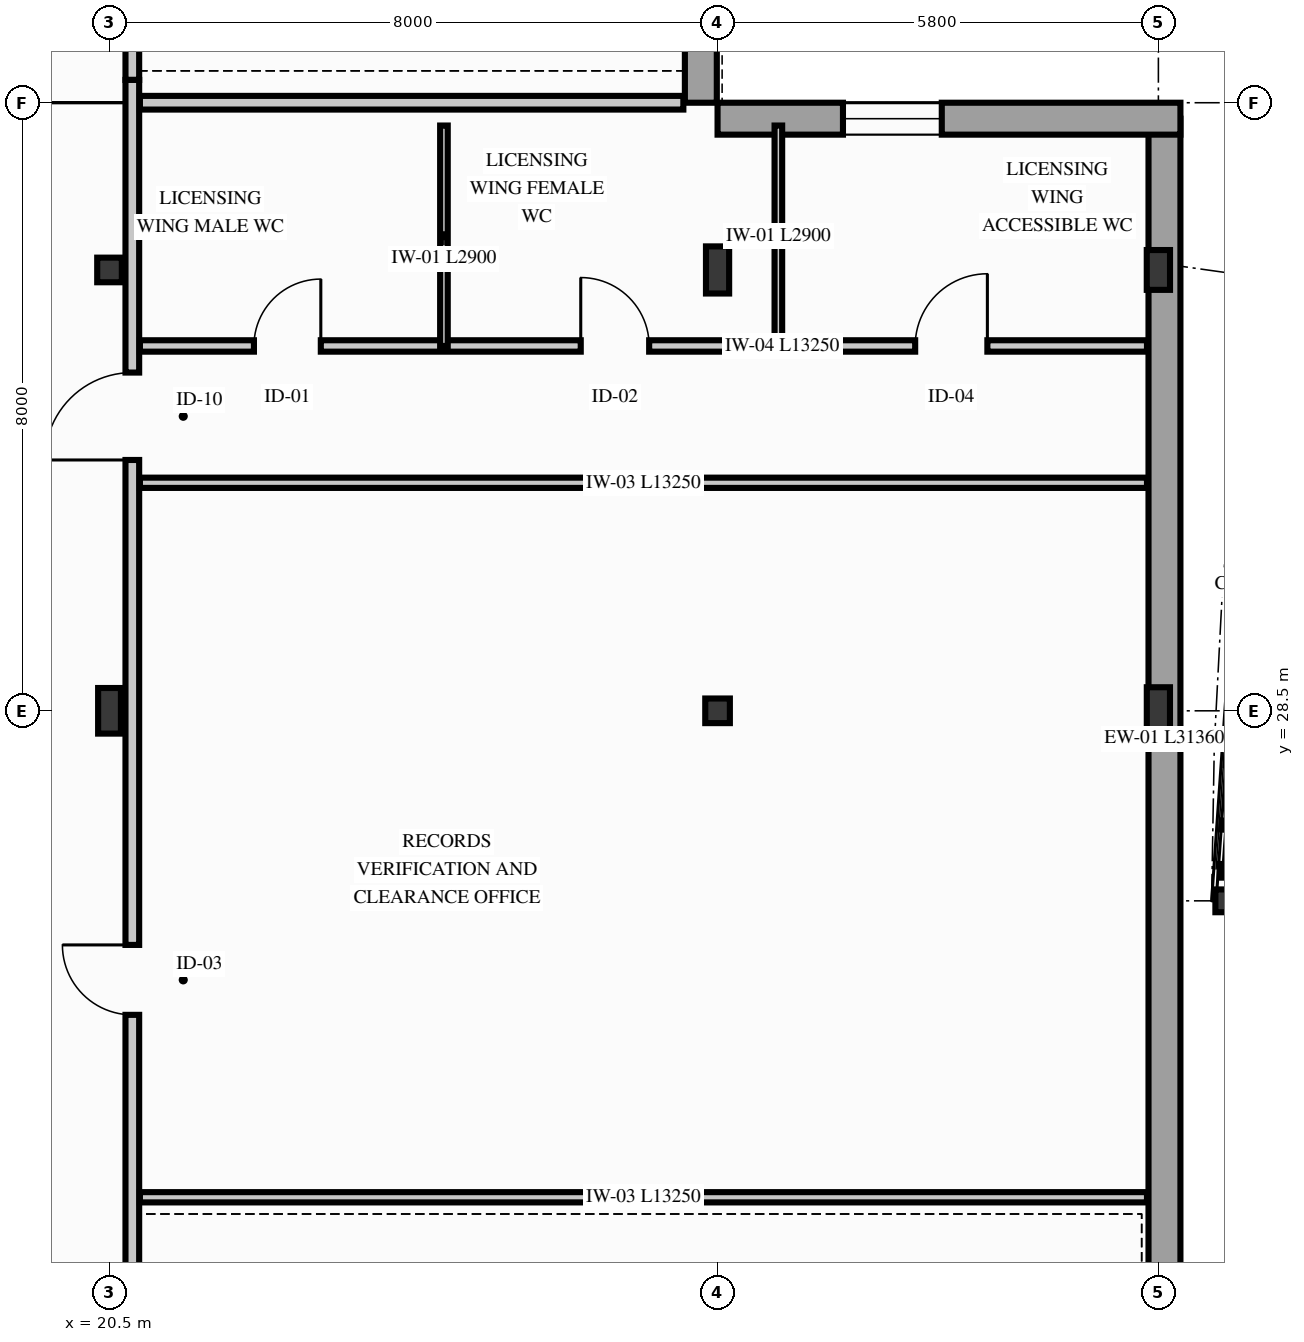
"""IFC4 building model, lengths in metres.
Left out: names, types, materials, properties, quantities, classifications, styles, units other than length and angle.
Written with IfcOpenShell. Run it as: python <this file> out.ifc"""

import sys

from ifc_helpers import new_model, si_unit, direction, frame, frame_2d, origin, origin_2d, place, context, subcontext, project, spatial, rectangle, hollow_circle, i_section, extrude, element, fill, save


model = new_model("IFC4")
c1 = context("Model", 3, precision=1e-05, world=origin(), true_north=direction((0.0, 1.0)))
c2 = subcontext(c1, "Body", "Model", "MODEL_VIEW")
j1 = project(units=[si_unit("LENGTHUNIT", "METRE"), si_unit("PLANEANGLEUNIT", "RADIAN")], contexts=[c1])
p1 = place(None, origin())
s1 = spatial("IfcSite", under=j1, at=p1, CompositionType="ELEMENT")
p2 = place(p1, origin())
s2 = spatial("IfcBuilding", under=s1, at=p2, CompositionType="ELEMENT")
p3 = place(p2, frame((0.0, 0.0, 5.1)))
s3 = spatial("IfcBuildingStorey", under=s2, at=p3, CompositionType="ELEMENT", Elevation=5.1)
for number, where, z_axis, x_axis in (
    (1, (35.35, 26.0, 0.0), (0.0, 0.0, 1.0), (0.0, 1.0, 0.0)),
    (2, (20.5, 28.5, 0.0), (0.0, 0.0, 1.0), (1.0, 0.0, 0.0)),
):
    element("IfcColumn", number, at=place(p3, frame(where, z_axis=z_axis, x_axis=x_axis)), inside=s3, PredefinedType="COLUMN", context=c2, shape_type="SweptSolid", body=[
        extrude(i_section(OverallWidth=0.3, OverallDepth=0.6, WebThickness=0.015, FlangeThickness=0.03, FilletRadius=0.027, at=origin_2d()), origin(), (0.0, 0.0, 1.0), 4.2),
    ])
for number, where, z_axis, x_axis in (
    (3, (20.5, 34.3, 0.0), (0.0, 0.0, 1.0), (1.0, 0.0, 0.0)),
    (4, (28.5, 28.5, 0.0), (0.0, 0.0, 1.0), (1.0, 0.0, 0.0)),
):
    element("IfcColumn", number, at=place(p3, frame(where, z_axis=z_axis, x_axis=x_axis)), inside=s3, PredefinedType="COLUMN", context=c2, shape_type="SweptSolid", body=[
        extrude(hollow_circle(Radius=0.162, WallThickness=0.016, at=origin_2d()), origin(), (0.0, 0.0, 1.0), 4.2),
    ])
for number, where, z_axis, x_axis in (
    (5, (28.5, 34.3, 0.0), (0.0, 0.0, 1.0), (1.0, 0.0, 0.0)),
    (6, (34.3, 28.5, 0.0), (0.0, 0.0, 1.0), (1.0, 0.0, 0.0)),
):
    element("IfcColumn", number, at=place(p3, frame(where, z_axis=z_axis, x_axis=x_axis)), inside=s3, PredefinedType="COLUMN", context=c2, shape_type="SweptSolid", body=[
        extrude(i_section(OverallWidth=0.305, OverallDepth=0.62, WebThickness=0.021, FlangeThickness=0.04, FilletRadius=0.027, at=origin_2d()), origin(), (0.0, 0.0, 1.0), 4.2),
    ])
p4 = place(p3, frame((34.3, 34.3, 0.0), z_axis=(0.0, 0.0, 1.0), x_axis=(1.0, 0.0, 0.0)))
e7 = element("IfcColumn", 7, at=p4, inside=s3, PredefinedType="COLUMN", context=c2, shape_type="SweptSolid", body=[
    extrude(i_section(OverallWidth=0.306, OverallDepth=0.524, WebThickness=0.021, FlangeThickness=0.04, FilletRadius=0.027, at=origin_2d()), origin(), (0.0, 0.0, 1.0), 4.2),
])
p5 = place(p3, frame((34.38, 4.93, 0.0), z_axis=(0.0, 0.0, 1.0), x_axis=(0.0, 1.0, 0.0)))
e8 = element("IfcWall", 8, at=p5, inside=s3, PredefinedType="SOLIDWALL", context=c2, shape_type="SweptSolid", body=[
    extrude(rectangle(XDim=31.36, YDim=0.42, at=frame_2d((15.68, 0.0))), origin(), (0.0, 0.0, 1.0), 3.68),
])
p6 = place(p5, frame((1.65, 0.0, 0.85)))
e9 = element("IfcOpeningElement", 9, at=p6, cuts=e8, PredefinedType="OPENING", context=c2, shape_type="SweptSolid", body=[
    extrude(rectangle(XDim=1.3, YDim=2.15, at=frame_2d((0.65, 1.075))), frame((0.0, 0.22, 0.0), z_axis=(0.0, -1.0, 0.0), x_axis=(1.0, 0.0, 0.0)), (0.0, 0.0, 1.0), 0.44),
])
p7 = place(p5, frame((9.65, 0.0, 0.74)))
e10 = element("IfcOpeningElement", 10, at=p7, cuts=e8, PredefinedType="OPENING", context=c2, shape_type="SweptSolid", body=[
    extrude(rectangle(XDim=1.6, YDim=2.4, at=frame_2d((0.8, 1.2))), frame((0.0, 0.22, 0.0), z_axis=(0.0, -1.0, 0.0), x_axis=(1.0, 0.0, 0.0)), (0.0, 0.0, 1.0), 0.44),
])
p8 = place(p5, frame((13.65, 0.0, 0.85)))
e11 = element("IfcOpeningElement", 11, at=p8, cuts=e8, PredefinedType="OPENING", context=c2, shape_type="SweptSolid", body=[
    extrude(rectangle(XDim=1.4, YDim=2.2, at=frame_2d((0.7, 1.1))), frame((0.0, 0.22, 0.0), z_axis=(0.0, -1.0, 0.0), x_axis=(1.0, 0.0, 0.0)), (0.0, 0.0, 1.0), 0.44),
])
p9 = place(p3, frame((28.5, 36.29, 0.0), z_axis=(0.0, 0.0, 1.0), x_axis=(1.0, 0.0, 0.0)))
e12 = element("IfcWall", 12, at=p9, inside=s3, PredefinedType="SOLIDWALL", context=c2, shape_type="SweptSolid", body=[
    extrude(rectangle(XDim=6.09, YDim=0.42, at=frame_2d((3.045, 0.0))), origin(), (0.0, 0.0, 1.0), 3.94),
])
p10 = place(p9, frame((1.65, 0.0, 0.85)))
e13 = element("IfcOpeningElement", 13, at=p10, cuts=e12, PredefinedType="OPENING", context=c2, shape_type="SweptSolid", body=[
    extrude(rectangle(XDim=1.3, YDim=2.15, at=frame_2d((0.65, 1.075))), frame((0.0, 0.22, 0.0), z_axis=(0.0, -1.0, 0.0), x_axis=(1.0, 0.0, 0.0)), (0.0, 0.0, 1.0), 0.44),
])
p11 = place(p3, frame((28.28, 36.5, 0.0), z_axis=(0.0, 0.0, 1.0), x_axis=(0.0, 1.0, 0.0)))
e14 = element("IfcWall", 14, at=p11, inside=s3, PredefinedType="SOLIDWALL", context=c2, shape_type="SweptSolid", body=[
    extrude(rectangle(XDim=47.0, YDim=0.42, at=frame_2d((23.5, 0.0))), origin(), (0.0, 0.0, 1.0), 3.66),
])
p12 = place(p11, frame((1.65, 0.0, 0.74)))
e15 = element("IfcOpeningElement", 15, at=p12, cuts=e14, PredefinedType="OPENING", context=c2, shape_type="SweptSolid", body=[
    extrude(rectangle(XDim=1.6, YDim=2.4, at=frame_2d((0.8, 1.2))), frame((0.0, 0.22, 0.0), z_axis=(0.0, -1.0, 0.0), x_axis=(1.0, 0.0, 0.0)), (0.0, 0.0, 1.0), 0.44),
])
p13 = place(p11, frame((5.75, 0.0, 0.74)))
e16 = element("IfcOpeningElement", 16, at=p13, cuts=e14, PredefinedType="OPENING", context=c2, shape_type="SweptSolid", body=[
    extrude(rectangle(XDim=1.8, YDim=2.4, at=frame_2d((0.9, 1.2))), frame((0.0, 0.22, 0.0), z_axis=(0.0, -1.0, 0.0), x_axis=(1.0, 0.0, 0.0)), (0.0, 0.0, 1.0), 0.44),
])
p14 = place(p11, frame((9.85, 0.0, 0.84)))
e17 = element("IfcOpeningElement", 17, at=p14, cuts=e14, PredefinedType="OPENING", context=c2, shape_type="SweptSolid", body=[
    extrude(rectangle(XDim=1.5, YDim=2.3, at=frame_2d((0.75, 1.15))), frame((0.0, 0.22, 0.0), z_axis=(0.0, -1.0, 0.0), x_axis=(1.0, 0.0, 0.0)), (0.0, 0.0, 1.0), 0.44),
])
p15 = place(p11, frame((13.95, 0.0, 0.85)))
e18 = element("IfcOpeningElement", 18, at=p15, cuts=e14, PredefinedType="OPENING", context=c2, shape_type="SweptSolid", body=[
    extrude(rectangle(XDim=1.4, YDim=2.2, at=frame_2d((0.7, 1.1))), frame((0.0, 0.22, 0.0), z_axis=(0.0, -1.0, 0.0), x_axis=(1.0, 0.0, 0.0)), (0.0, 0.0, 1.0), 0.44),
])
p16 = place(p11, frame((26.25, 0.0, 0.74)))
e19 = element("IfcOpeningElement", 19, at=p16, cuts=e14, PredefinedType="OPENING", context=c2, shape_type="SweptSolid", body=[
    extrude(rectangle(XDim=1.6, YDim=2.4, at=frame_2d((0.8, 1.2))), frame((0.0, 0.22, 0.0), z_axis=(0.0, -1.0, 0.0), x_axis=(1.0, 0.0, 0.0)), (0.0, 0.0, 1.0), 0.44),
])
p17 = place(p11, frame((34.45, 0.0, 0.84)))
e20 = element("IfcOpeningElement", 20, at=p17, cuts=e14, PredefinedType="OPENING", context=c2, shape_type="SweptSolid", body=[
    extrude(rectangle(XDim=1.5, YDim=2.3, at=frame_2d((0.75, 1.15))), frame((0.0, 0.22, 0.0), z_axis=(0.0, -1.0, 0.0), x_axis=(1.0, 0.0, 0.0)), (0.0, 0.0, 1.0), 0.44),
])
p18 = place(p11, frame((42.65, 0.0, 0.54)))
e21 = element("IfcOpeningElement", 21, at=p18, cuts=e14, PredefinedType="OPENING", context=c2, shape_type="SweptSolid", body=[
    extrude(rectangle(XDim=2.2, YDim=2.6, at=frame_2d((1.1, 1.3))), frame((0.0, 0.22, 0.0), z_axis=(0.0, -1.0, 0.0), x_axis=(1.0, 0.0, 0.0)), (0.0, 0.0, 1.0), 0.44),
])
p19 = place(p3, frame((20.8, 36.8, 0.0), z_axis=(0.0, 0.0, 1.0), x_axis=(0.0, 1.0, 0.0)))
e22 = element("IfcWall", 22, at=p19, inside=s3, PredefinedType="PARTITIONING", context=c2, shape_type="SweptSolid", body=[
    extrude(rectangle(XDim=38.05, YDim=0.18, at=frame_2d((19.025, 0.0))), origin(), (0.0, 0.0, 1.0), 3.658),
])
p20 = place(p19, frame((5.65, 0.0, 0.0)))
e23 = element("IfcOpeningElement", 23, at=p20, cuts=e22, PredefinedType="OPENING", context=c2, shape_type="SweptSolid", body=[
    extrude(rectangle(XDim=1.08, YDim=2.22, at=frame_2d((0.54, 1.11))), frame((0.0, 0.1, 0.0), z_axis=(0.0, -1.0, 0.0), x_axis=(1.0, 0.0, 0.0)), (0.0, 0.0, 1.0), 0.2),
])
p21 = place(p19, frame((20.0, 0.0, 0.0)))
e24 = element("IfcOpeningElement", 24, at=p21, cuts=e22, PredefinedType="OPENING", context=c2, shape_type="SweptSolid", body=[
    extrude(rectangle(XDim=1.05, YDim=2.2, at=frame_2d((0.525, 1.1))), frame((0.0, 0.1, 0.0), z_axis=(0.0, -1.0, 0.0), x_axis=(1.0, 0.0, 0.0)), (0.0, 0.0, 1.0), 0.2),
])
p22 = place(p3, frame((20.8, 5.0, 0.0), z_axis=(0.0, 0.0, 1.0), x_axis=(0.0, 1.0, 0.0)))
e25 = element("IfcWall", 25, at=p22, inside=s3, PredefinedType="PARTITIONING", context=c2, shape_type="SweptSolid", body=[
    extrude(rectangle(XDim=31.8, YDim=0.18, at=frame_2d((15.9, 0.0))), origin(), (0.0, 0.0, 1.0), 3.678),
])
p23 = place(p22, frame((8.4, 0.0, 0.0)))
e26 = element("IfcOpeningElement", 26, at=p23, cuts=e25, PredefinedType="OPENING", context=c2, shape_type="SweptSolid", body=[
    extrude(rectangle(XDim=0.98, YDim=2.16, at=frame_2d((0.49, 1.08))), frame((0.0, 0.1, 0.0), z_axis=(0.0, -1.0, 0.0), x_axis=(1.0, 0.0, 0.0)), (0.0, 0.0, 1.0), 0.2),
])
p24 = place(p22, frame((19.5, 0.0, 0.0)))
e27 = element("IfcOpeningElement", 27, at=p24, cuts=e25, PredefinedType="OPENING", context=c2, shape_type="SweptSolid", body=[
    extrude(rectangle(XDim=0.92, YDim=2.12, at=frame_2d((0.46, 1.06))), frame((0.0, 0.1, 0.0), z_axis=(0.0, -1.0, 0.0), x_axis=(1.0, 0.0, 0.0)), (0.0, 0.0, 1.0), 0.2),
])
p25 = place(p22, frame((26.8, 0.0, 0.0)))
e28 = element("IfcOpeningElement", 28, at=p25, cuts=e25, PredefinedType="OPENING", context=c2, shape_type="SweptSolid", body=[
    extrude(rectangle(XDim=1.15, YDim=2.2, at=frame_2d((0.575, 1.1))), frame((0.0, 0.1, 0.0), z_axis=(0.0, -1.0, 0.0), x_axis=(1.0, 0.0, 0.0)), (0.0, 0.0, 1.0), 0.2),
])
p26 = place(p3, frame((20.9, 36.5, 0.0), z_axis=(0.0, 0.0, 1.0), x_axis=(1.0, 0.0, 0.0)))
e29 = element("IfcWall", 29, at=p26, inside=s3, PredefinedType="PARTITIONING", context=c2, shape_type="SweptSolid", body=[
    extrude(rectangle(XDim=7.15, YDim=0.18, at=frame_2d((3.575, 0.0))), origin(), (0.0, 0.0, 1.0), 3.92),
])
p27 = place(p3, frame((20.9, 22.1, 0.0), z_axis=(0.0, 0.0, 1.0), x_axis=(1.0, 0.0, 0.0)))
e30 = element("IfcWall", 30, at=p27, inside=s3, PredefinedType="PARTITIONING", context=c2, shape_type="SweptSolid", body=[
    extrude(rectangle(XDim=13.25, YDim=0.135, at=frame_2d((6.625, 0.0))), origin(), (0.0, 0.0, 1.0), 3.578),
])
p28 = place(p3, frame((20.9, 33.3, 0.0), z_axis=(0.0, 0.0, 1.0), x_axis=(1.0, 0.0, 0.0)))
e31 = element("IfcWall", 31, at=p28, inside=s3, PredefinedType="PARTITIONING", context=c2, shape_type="SweptSolid", body=[
    extrude(rectangle(XDim=13.25, YDim=0.15, at=frame_2d((6.625, 0.0))), origin(), (0.0, 0.0, 1.0), 3.578),
])
p29 = place(p28, frame((1.5, 0.0, 0.0)))
e32 = element("IfcOpeningElement", 32, at=p29, cuts=e31, PredefinedType="OPENING", context=c2, shape_type="SweptSolid", body=[
    extrude(rectangle(XDim=0.88, YDim=2.1, at=frame_2d((0.44, 1.05))), frame((0.0, 0.085, 0.0), z_axis=(0.0, -1.0, 0.0), x_axis=(1.0, 0.0, 0.0)), (0.0, 0.0, 1.0), 0.17),
])
p30 = place(p28, frame((5.8, 0.0, 0.0)))
e33 = element("IfcOpeningElement", 33, at=p30, cuts=e31, PredefinedType="OPENING", context=c2, shape_type="SweptSolid", body=[
    extrude(rectangle(XDim=0.9, YDim=2.1, at=frame_2d((0.45, 1.05))), frame((0.0, 0.085, 0.0), z_axis=(0.0, -1.0, 0.0), x_axis=(1.0, 0.0, 0.0)), (0.0, 0.0, 1.0), 0.17),
])
p31 = place(p28, frame((10.2, 0.0, 0.0)))
e34 = element("IfcOpeningElement", 34, at=p31, cuts=e31, PredefinedType="OPENING", context=c2, shape_type="SweptSolid", body=[
    extrude(rectangle(XDim=0.95, YDim=2.15, at=frame_2d((0.475, 1.075))), frame((0.0, 0.085, 0.0), z_axis=(0.0, -1.0, 0.0), x_axis=(1.0, 0.0, 0.0)), (0.0, 0.0, 1.0), 0.17),
])
p32 = place(p3, frame((20.9, 31.5, 0.0), z_axis=(0.0, 0.0, 1.0), x_axis=(1.0, 0.0, 0.0)))
e35 = element("IfcWall", 35, at=p32, inside=s3, PredefinedType="PARTITIONING", context=c2, shape_type="SweptSolid", body=[
    extrude(rectangle(XDim=13.25, YDim=0.135, at=frame_2d((6.625, 0.0))), origin(), (0.0, 0.0, 1.0), 3.578),
])
for number, where, z_axis, x_axis in (
    (36, (24.9, 33.3, 0.0), (0.0, 0.0, 1.0), (0.0, 1.0, 0.0)),
    (37, (29.3, 33.3, 0.0), (0.0, 0.0, 1.0), (0.0, 1.0, 0.0)),
):
    element("IfcWall", number, at=place(p3, frame(where, z_axis=z_axis, x_axis=x_axis)), inside=s3, PredefinedType="PARTITIONING", context=c2, shape_type="SweptSolid", body=[
        extrude(rectangle(XDim=2.9, YDim=0.1, at=frame_2d((1.45, 0.0))), origin(), (0.0, 0.0, 1.0), 3.92),
    ])
p33 = place(p10, origin())
e38 = element("IfcWindow", 38, at=p33, inside=s3, PartitioningType="SINGLE_PANEL", PredefinedType="WINDOW", context=c2, shape_type="SweptSolid", body=[
    extrude(rectangle(XDim=1.3, YDim=2.15, at=frame_2d((0.65, 1.075))), frame((0.0, 0.03, 0.0), z_axis=(0.0, -1.0, 0.0), x_axis=(1.0, 0.0, 0.0)), (0.0, 0.0, 1.0), 0.06),
])
fill(e13, e38)
p34 = place(p24, origin())
e39 = element("IfcDoor", 39, at=p34, inside=s3, OperationType="SINGLE_SWING_RIGHT", PredefinedType="DOOR", context=c2, shape_type="SweptSolid", body=[
    extrude(rectangle(XDim=0.92, YDim=2.12, at=frame_2d((0.46, 1.06))), frame((0.0, 0.025, 0.0), z_axis=(0.0, -1.0, 0.0), x_axis=(1.0, 0.0, 0.0)), (0.0, 0.0, 1.0), 0.05),
])
fill(e27, e39)
p35 = place(p25, origin())
e40 = element("IfcDoor", 40, at=p35, inside=s3, OperationType="SINGLE_SWING_LEFT", PredefinedType="DOOR", context=c2, shape_type="SweptSolid", body=[
    extrude(rectangle(XDim=1.15, YDim=2.2, at=frame_2d((0.575, 1.1))), frame((0.0, 0.025, 0.0), z_axis=(0.0, -1.0, 0.0), x_axis=(1.0, 0.0, 0.0)), (0.0, 0.0, 1.0), 0.05),
])
fill(e28, e40)
p36 = place(p29, origin())
e41 = element("IfcDoor", 41, at=p36, inside=s3, OperationType="SINGLE_SWING_RIGHT", PredefinedType="DOOR", context=c2, shape_type="SweptSolid", body=[
    extrude(rectangle(XDim=0.88, YDim=2.1, at=frame_2d((0.44, 1.05))), frame((0.0, 0.025, 0.0), z_axis=(0.0, -1.0, 0.0), x_axis=(1.0, 0.0, 0.0)), (0.0, 0.0, 1.0), 0.05),
])
fill(e32, e41)
p37 = place(p30, origin())
e42 = element("IfcDoor", 42, at=p37, inside=s3, OperationType="SINGLE_SWING_LEFT", PredefinedType="DOOR", context=c2, shape_type="SweptSolid", body=[
    extrude(rectangle(XDim=0.9, YDim=2.1, at=frame_2d((0.45, 1.05))), frame((0.0, 0.025, 0.0), z_axis=(0.0, -1.0, 0.0), x_axis=(1.0, 0.0, 0.0)), (0.0, 0.0, 1.0), 0.05),
])
fill(e33, e42)
p38 = place(p31, origin())
e43 = element("IfcDoor", 43, at=p38, inside=s3, OperationType="SINGLE_SWING_RIGHT", PredefinedType="DOOR", context=c2, shape_type="SweptSolid", body=[
    extrude(rectangle(XDim=0.95, YDim=2.15, at=frame_2d((0.475, 1.075))), frame((0.0, 0.025, 0.0), z_axis=(0.0, -1.0, 0.0), x_axis=(1.0, 0.0, 0.0)), (0.0, 0.0, 1.0), 0.05),
])
fill(e34, e43)
save(model, sys.argv[1])
